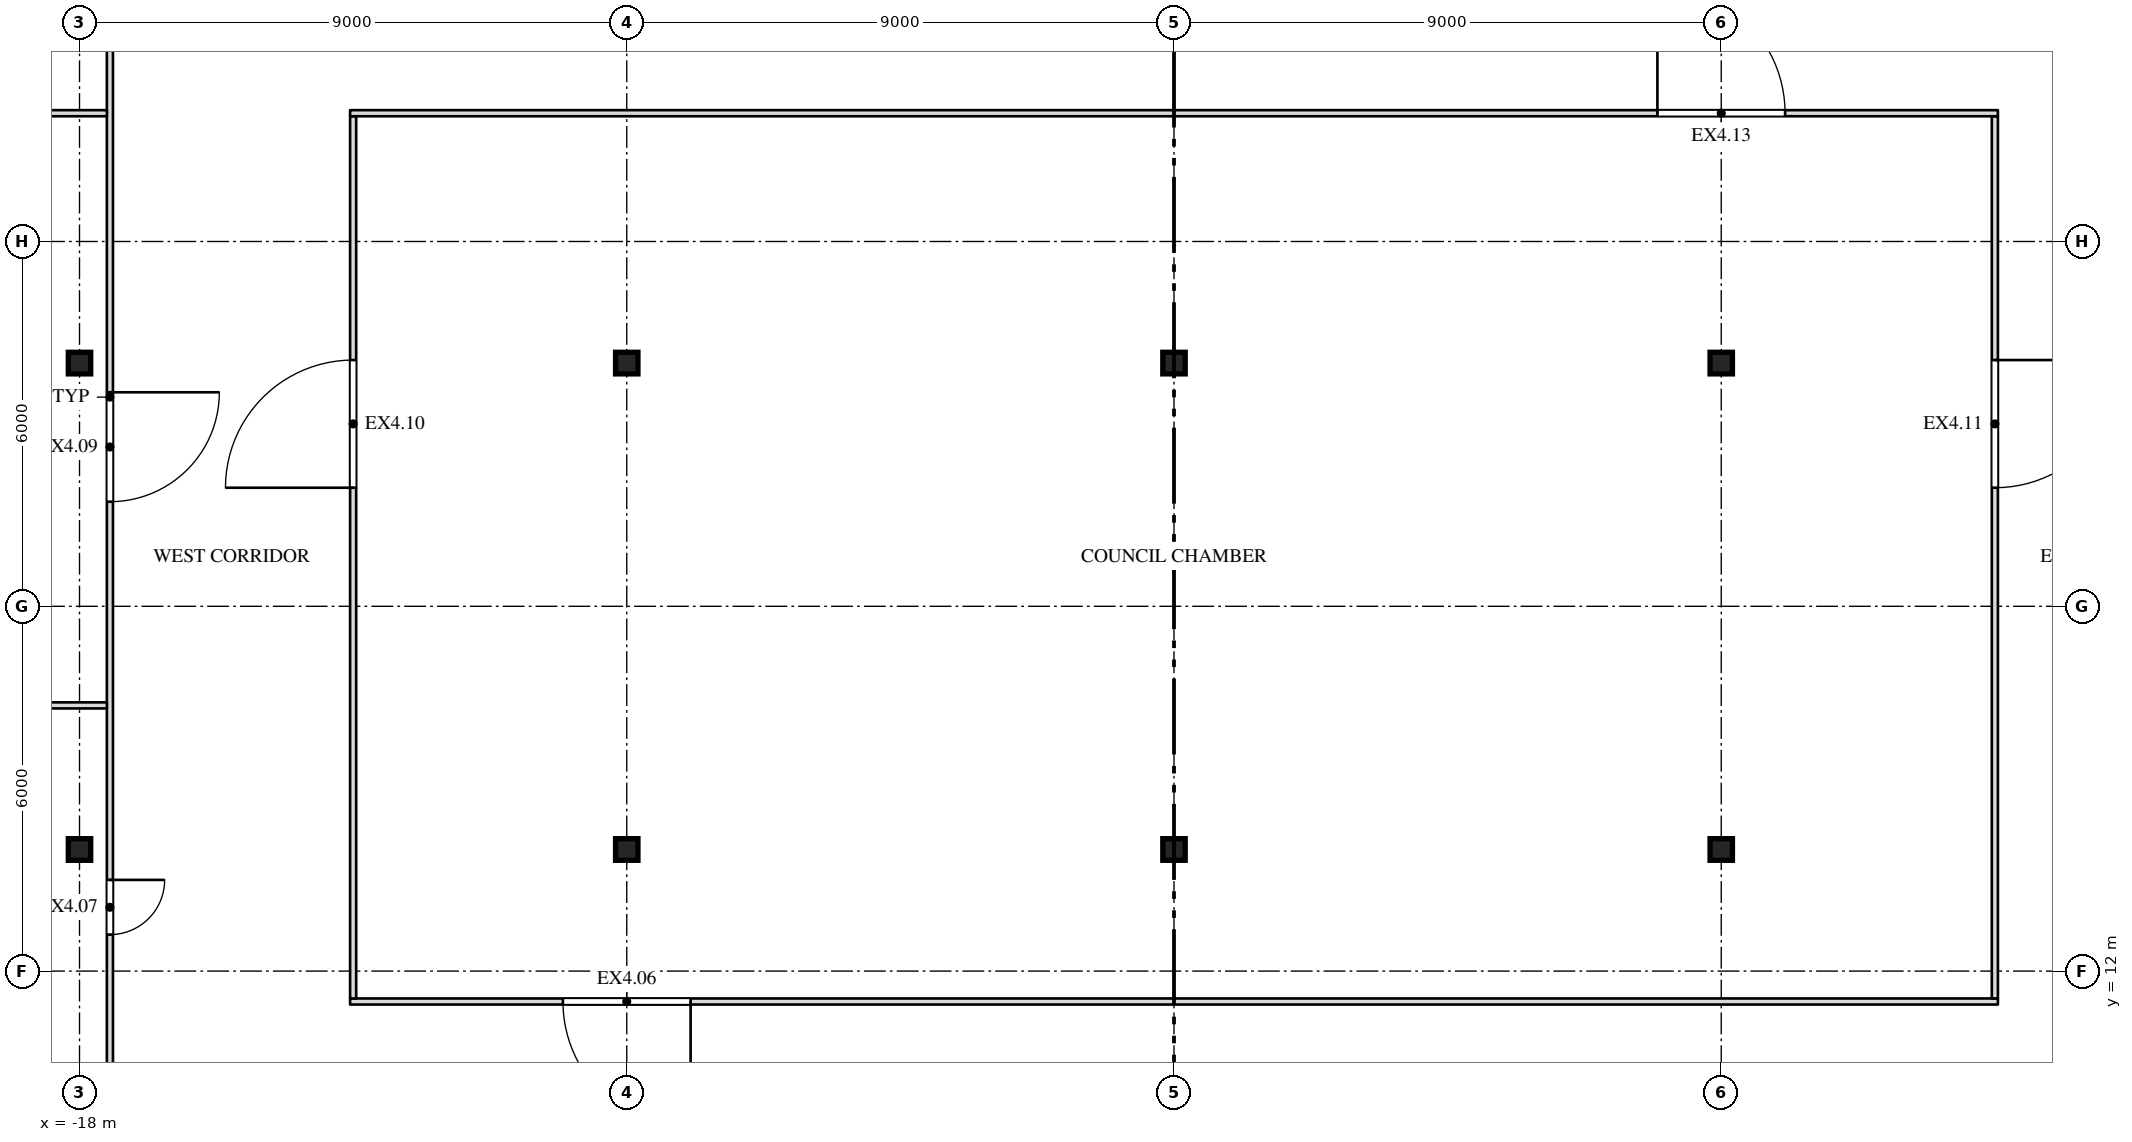
"""IFC4 building model, lengths in metres.
Left out: names, types, materials, properties, quantities, classifications, styles, units other than length and angle.
Written with IfcOpenShell. Run it as: python <this file> out.ifc"""

import sys

from ifc_helpers import new_model, si_unit, direction, frame, frame_2d, origin, origin_2d, place, context, subcontext, project, spatial, rectangle, i_section, extrude, element, fill, save


model = new_model("IFC4")
c1 = context("Model", 3, precision=1e-05, world=origin(), true_north=direction((0.0, 1.0)))
c2 = subcontext(c1, "Body", "Model", "MODEL_VIEW")
j1 = project(units=[si_unit("LENGTHUNIT", "METRE"), si_unit("PLANEANGLEUNIT", "RADIAN")], contexts=[c1])
p1 = place(None, origin())
s1 = spatial("IfcSite", under=j1, at=p1, CompositionType="ELEMENT")
p2 = place(p1, origin())
s2 = spatial("IfcBuilding", under=s1, at=p2, CompositionType="ELEMENT")
p3 = place(p2, frame((0.0, 0.0, 284.5)))
s3 = spatial("IfcBuildingStorey", under=s2, at=p3, CompositionType="ELEMENT", Elevation=284.5)
for number, where, z_axis, x_axis in (
    (1, (-18.0, 14.0, 0.0), (0.0, 0.0, 1.0), (1.0, 0.0, 0.0)),
    (2, (-9.0, 14.0, 0.0), (0.0, 0.0, 1.0), (1.0, 0.0, 0.0)),
    (3, (0.0, 14.0, 0.0), (0.0, 0.0, 1.0), (1.0, 0.0, 0.0)),
    (4, (9.0, 14.0, 0.0), (0.0, 0.0, 1.0), (1.0, 0.0, 0.0)),
    (5, (-18.0, 22.0, 0.0), (0.0, 0.0, 1.0), (1.0, 0.0, 0.0)),
    (6, (-9.0, 22.0, 0.0), (0.0, 0.0, 1.0), (1.0, 0.0, 0.0)),
    (7, (0.0, 22.0, 0.0), (0.0, 0.0, 1.0), (1.0, 0.0, 0.0)),
    (8, (9.0, 22.0, 0.0), (0.0, 0.0, 1.0), (1.0, 0.0, 0.0)),
):
    element("IfcColumn", number, at=place(p3, frame(where, z_axis=z_axis, x_axis=x_axis)), inside=s3, PredefinedType="COLUMN", context=c2, shape_type="SweptSolid", body=[
        extrude(i_section(OverallWidth=0.368, OverallDepth=0.356, WebThickness=0.011, FlangeThickness=0.018, at=origin_2d()), origin(), (0.0, 0.0, 1.0), 4.0),
    ])
p4 = place(p3, frame((-17.5, 6.68, 0.0), z_axis=(0.0, 0.0, 1.0), x_axis=(0.0, 1.0, 0.0)))
e9 = element("IfcWall", 9, at=p4, inside=s3, PredefinedType="PARTITIONING", context=c2, shape_type="SweptSolid", body=[
    extrude(rectangle(XDim=29.52, YDim=0.1, at=frame_2d((14.76, 0.0))), origin(), (0.0, 0.0, 1.0), 3.78),
])
p5 = place(p4, frame((5.92, 0.0, 0.0)))
e10 = element("IfcOpeningElement", 10, at=p5, cuts=e9, PredefinedType="OPENING", context=c2, shape_type="SweptSolid", body=[
    extrude(rectangle(XDim=0.9, YDim=2.1, at=frame_2d((0.45, 1.05))), frame((0.0, 0.062, 0.0), z_axis=(0.0, -1.0, 0.0), x_axis=(1.0, 0.0, 0.0)), (0.0, 0.0, 1.0), 0.124),
])
p6 = place(p4, frame((13.04, 0.0, 0.0)))
e11 = element("IfcOpeningElement", 11, at=p6, cuts=e9, PredefinedType="OPENING", context=c2, shape_type="SweptSolid", body=[
    extrude(rectangle(XDim=1.8, YDim=2.1, at=frame_2d((0.9, 1.05))), frame((0.0, 0.062, 0.0), z_axis=(0.0, -1.0, 0.0), x_axis=(1.0, 0.0, 0.0)), (0.0, 0.0, 1.0), 0.124),
])
p7 = place(p4, frame((24.03, 0.0, 0.0)))
e12 = element("IfcOpeningElement", 12, at=p7, cuts=e9, PredefinedType="OPENING", context=c2, shape_type="SweptSolid", body=[
    extrude(rectangle(XDim=0.9, YDim=2.1, at=frame_2d((0.45, 1.05))), frame((0.0, 0.062, 0.0), z_axis=(0.0, -1.0, 0.0), x_axis=(1.0, 0.0, 0.0)), (0.0, 0.0, 1.0), 0.124),
])
p8 = place(p3, frame((-13.55, 11.5, 0.0), z_axis=(0.0, 0.0, 1.0), x_axis=(1.0, 0.0, 0.0)))
e13 = element("IfcWall", 13, at=p8, inside=s3, PredefinedType="PARTITIONING", context=c2, shape_type="SweptSolid", body=[
    extrude(rectangle(XDim=27.1, YDim=0.1, at=frame_2d((13.55, 0.0))), origin(), (0.0, 0.0, 1.0), 3.78),
])
p9 = place(p8, frame((3.5, 0.0, 0.0)))
e14 = element("IfcOpeningElement", 14, at=p9, cuts=e13, PredefinedType="OPENING", context=c2, shape_type="SweptSolid", body=[
    extrude(rectangle(XDim=2.1, YDim=2.4, at=frame_2d((1.05, 1.2))), frame((0.0, 0.062, 0.0), z_axis=(0.0, -1.0, 0.0), x_axis=(1.0, 0.0, 0.0)), (0.0, 0.0, 1.0), 0.124),
])
p10 = place(p3, frame((-13.5, 11.55, 0.0), z_axis=(0.0, 0.0, 1.0), x_axis=(0.0, 1.0, 0.0)))
e15 = element("IfcWall", 15, at=p10, inside=s3, PredefinedType="PARTITIONING", context=c2, shape_type="SweptSolid", body=[
    extrude(rectangle(XDim=14.51, YDim=0.1, at=frame_2d((7.255, 0.0))), origin(), (0.0, 0.0, 1.0), 3.247),
])
p11 = place(p10, frame((8.4, 0.0, 0.0)))
e16 = element("IfcOpeningElement", 16, at=p11, cuts=e15, PredefinedType="OPENING", context=c2, shape_type="SweptSolid", body=[
    extrude(rectangle(XDim=2.1, YDim=2.4, at=frame_2d((1.05, 1.2))), frame((0.0, 0.062, 0.0), z_axis=(0.0, -1.0, 0.0), x_axis=(1.0, 0.0, 0.0)), (0.0, 0.0, 1.0), 0.124),
])
p12 = place(p3, frame((13.5, 11.55, 0.0), z_axis=(0.0, 0.0, 1.0), x_axis=(0.0, 1.0, 0.0)))
e17 = element("IfcWall", 17, at=p12, inside=s3, PredefinedType="PARTITIONING", context=c2, shape_type="SweptSolid", body=[
    extrude(rectangle(XDim=14.51, YDim=0.1, at=frame_2d((7.255, 0.0))), origin(), (0.0, 0.0, 1.0), 3.247),
])
p13 = place(p12, frame((8.4, 0.0, 0.0)))
e18 = element("IfcOpeningElement", 18, at=p13, cuts=e17, PredefinedType="OPENING", context=c2, shape_type="SweptSolid", body=[
    extrude(rectangle(XDim=2.1, YDim=2.4, at=frame_2d((1.05, 1.2))), frame((0.0, 0.062, 0.0), z_axis=(0.0, -1.0, 0.0), x_axis=(1.0, 0.0, 0.0)), (0.0, 0.0, 1.0), 0.124),
])
for number, where, z_axis, x_axis in (
    (19, (-32.2, 16.37, 0.0), (0.0, 0.0, 1.0), (1.0, 0.0, 0.0)),
    (20, (-32.2, 26.11, 0.0), (0.0, 0.0, 1.0), (1.0, 0.0, 0.0)),
):
    element("IfcWall", number, at=place(p3, frame(where, z_axis=z_axis, x_axis=x_axis)), inside=s3, PredefinedType="PARTITIONING", context=c2, shape_type="SweptSolid", body=[
        extrude(rectangle(XDim=14.65, YDim=0.1, at=frame_2d((7.325, 0.0))), origin(), (0.0, 0.0, 1.0), 3.78),
    ])
p14 = place(p3, frame((-13.55, 26.11, 0.0), z_axis=(0.0, 0.0, 1.0), x_axis=(1.0, 0.0, 0.0)))
e21 = element("IfcWall", 21, at=p14, inside=s3, PredefinedType="PARTITIONING", context=c2, shape_type="SweptSolid", body=[
    extrude(rectangle(XDim=27.1, YDim=0.1, at=frame_2d((13.55, 0.0))), origin(), (0.0, 0.0, 1.0), 3.78),
])
p15 = place(p14, frame((21.5, 0.0, 0.0)))
e22 = element("IfcOpeningElement", 22, at=p15, cuts=e21, PredefinedType="OPENING", context=c2, shape_type="SweptSolid", body=[
    extrude(rectangle(XDim=2.1, YDim=2.4, at=frame_2d((1.05, 1.2))), frame((0.0, 0.062, 0.0), z_axis=(0.0, -1.0, 0.0), x_axis=(1.0, 0.0, 0.0)), (0.0, 0.0, 1.0), 0.124),
])
p16 = place(p9, origin())
e23 = element("IfcDoor", 23, at=p16, inside=s3, OperationType="DOUBLE_DOOR_SINGLE_SWING", PredefinedType="DOOR", context=c2, shape_type="SweptSolid", body=[
    extrude(rectangle(XDim=2.1, YDim=2.4, at=frame_2d((1.05, 1.2))), frame((0.0, 0.025, 0.0), z_axis=(0.0, -1.0, 0.0), x_axis=(1.0, 0.0, 0.0)), (0.0, 0.0, 1.0), 0.05),
])
fill(e14, e23)
p17 = place(p5, origin())
e24 = element("IfcDoor", 24, at=p17, inside=s3, OperationType="SINGLE_SWING_LEFT", PredefinedType="DOOR", context=c2, shape_type="SweptSolid", body=[
    extrude(rectangle(XDim=0.9, YDim=2.1, at=frame_2d((0.45, 1.05))), frame((0.0, 0.025, 0.0), z_axis=(0.0, -1.0, 0.0), x_axis=(1.0, 0.0, 0.0)), (0.0, 0.0, 1.0), 0.05),
])
fill(e10, e24)
p18 = place(p6, origin())
e25 = element("IfcDoor", 25, at=p18, inside=s3, OperationType="DOUBLE_DOOR_SINGLE_SWING", PredefinedType="DOOR", context=c2, shape_type="SweptSolid", body=[
    extrude(rectangle(XDim=1.8, YDim=2.1, at=frame_2d((0.9, 1.05))), frame((0.0, 0.025, 0.0), z_axis=(0.0, -1.0, 0.0), x_axis=(1.0, 0.0, 0.0)), (0.0, 0.0, 1.0), 0.05),
])
fill(e11, e25)
p19 = place(p11, origin())
e26 = element("IfcDoor", 26, at=p19, inside=s3, OperationType="DOUBLE_DOOR_SINGLE_SWING", PredefinedType="DOOR", context=c2, shape_type="SweptSolid", body=[
    extrude(rectangle(XDim=2.1, YDim=2.4, at=frame_2d((1.05, 1.2))), frame((0.0, 0.025, 0.0), z_axis=(0.0, -1.0, 0.0), x_axis=(1.0, 0.0, 0.0)), (0.0, 0.0, 1.0), 0.05),
])
fill(e16, e26)
p20 = place(p13, origin())
e27 = element("IfcDoor", 27, at=p20, inside=s3, OperationType="DOUBLE_DOOR_SINGLE_SWING", PredefinedType="DOOR", context=c2, shape_type="SweptSolid", body=[
    extrude(rectangle(XDim=2.1, YDim=2.4, at=frame_2d((1.05, 1.2))), frame((0.0, 0.025, 0.0), z_axis=(0.0, -1.0, 0.0), x_axis=(1.0, 0.0, 0.0)), (0.0, 0.0, 1.0), 0.05),
])
fill(e18, e27)
p21 = place(p15, origin())
e28 = element("IfcDoor", 28, at=p21, inside=s3, OperationType="DOUBLE_DOOR_SINGLE_SWING", PredefinedType="DOOR", context=c2, shape_type="SweptSolid", body=[
    extrude(rectangle(XDim=2.1, YDim=2.4, at=frame_2d((1.05, 1.2))), frame((0.0, 0.025, 0.0), z_axis=(0.0, -1.0, 0.0), x_axis=(1.0, 0.0, 0.0)), (0.0, 0.0, 1.0), 0.05),
])
fill(e22, e28)
save(model, sys.argv[1])
